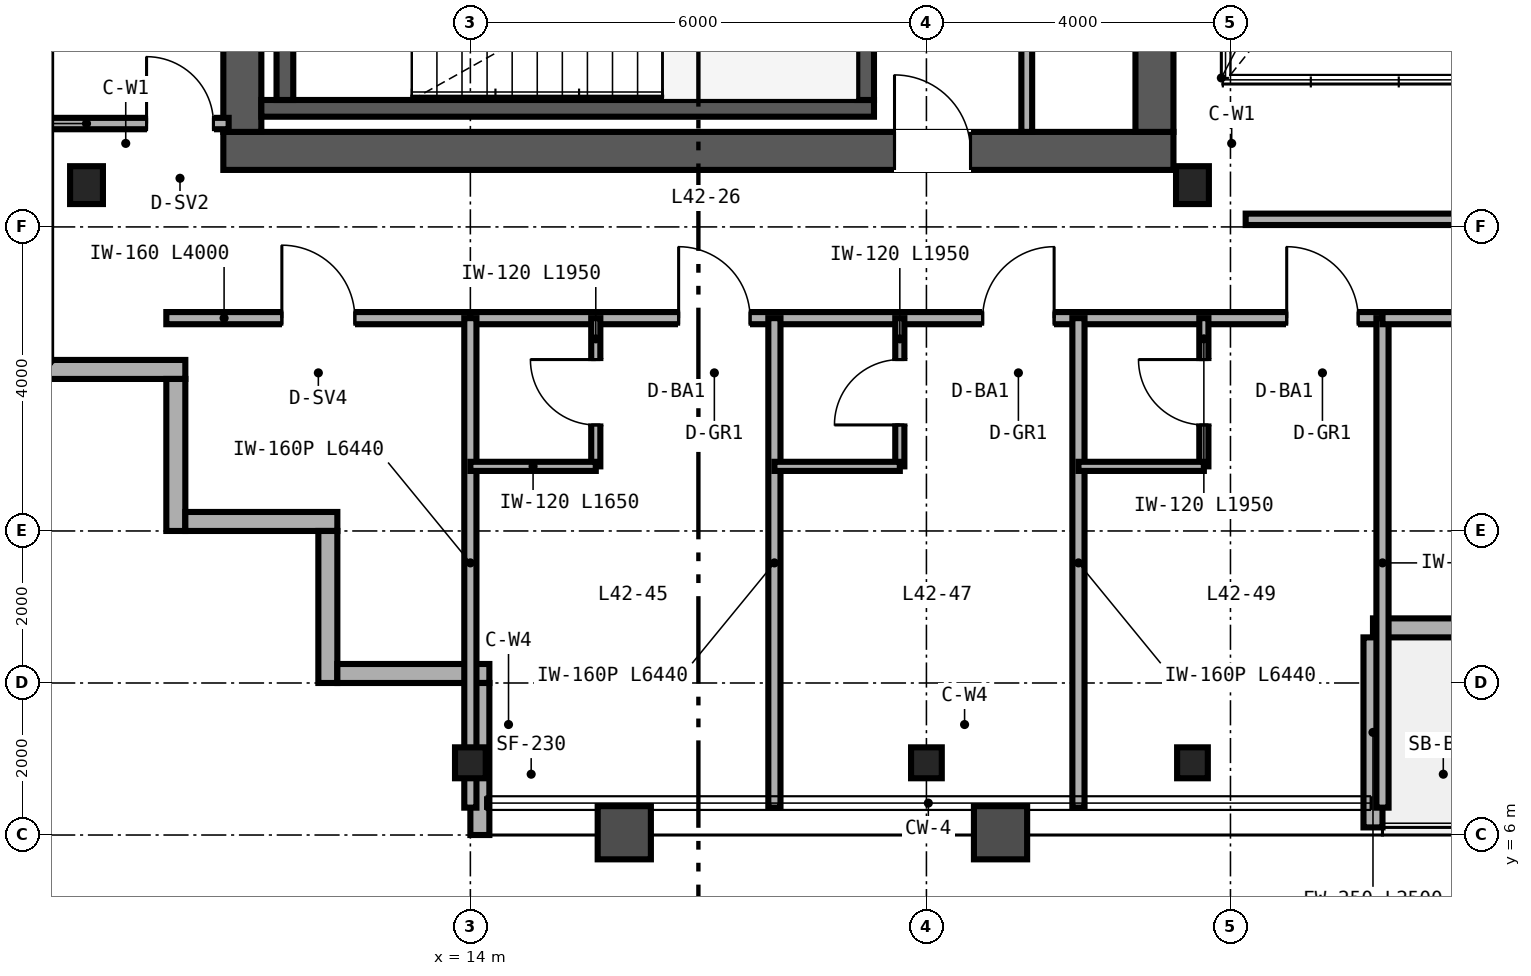
"""IFC4 building model, lengths in metres.
Left out: names, types, materials, properties, quantities, classifications, styles, units other than length and angle.
Written with IfcOpenShell. Run it as: python <this file> out.ifc"""

import sys

from ifc_helpers import new_model, si_unit, direction, frame, frame_2d, origin, origin_2d, place, context, subcontext, project, spatial, rectangle, i_section, extrude, source, transform, mapped, element, fill, save


model = new_model("IFC4")
c1 = context("Model", 3, precision=1e-05, world=origin(), true_north=direction((0.0, 1.0)))
c2 = subcontext(c1, "Body", "Model", "MODEL_VIEW")
j1 = project(units=[si_unit("LENGTHUNIT", "METRE"), si_unit("PLANEANGLEUNIT", "RADIAN")], contexts=[c1])
p1 = place(None, origin())
s1 = spatial("IfcSite", under=j1, at=p1, CompositionType="ELEMENT")
p2 = place(p1, origin())
s2 = spatial("IfcBuilding", under=s1, at=p2, CompositionType="ELEMENT")
p3 = place(p2, frame((0.0, 0.0, 170.4)))
s3 = spatial("IfcBuildingStorey", under=s2, at=p3, CompositionType="ELEMENT", Elevation=170.4)
p4 = place(p3, frame((10.75, 15.0, 0.0), z_axis=(0.0, 0.0, 1.0), x_axis=(1.0, 0.0, 0.0)))
e1 = element("IfcWall", 1, at=p4, inside=s3, PredefinedType="SHEAR", context=c2, shape_type="SweptSolid", body=[
    extrude(rectangle(XDim=12.5, YDim=0.5, at=frame_2d((6.25, 0.0))), origin(), (0.0, 0.0, 1.0), 3.37),
])
p5 = place(p4, frame((8.83, 0.0, 0.0)))
e2 = element("IfcOpeningElement", 2, at=p5, cuts=e1, PredefinedType="OPENING", context=c2, shape_type="SweptSolid", body=[
    extrude(rectangle(XDim=1.0, YDim=2.15, at=frame_2d((0.5, 1.075))), frame((0.0, 0.26, 0.0), z_axis=(0.0, -1.0, 0.0), x_axis=(1.0, 0.0, 0.0)), (0.0, 0.0, 1.0), 0.52),
])
for number, where, z_axis, x_axis in (
    (3, (11.0, 15.25, 0.0), (0.0, 0.0, 1.0), (0.0, 1.0, 0.0)),
    (4, (23.0, 15.25, 0.0), (0.0, 0.0, 1.0), (0.0, 1.0, 0.0)),
):
    element("IfcWall", number, at=place(p3, frame(where, z_axis=z_axis, x_axis=x_axis)), inside=s3, PredefinedType="SHEAR", context=c2, shape_type="SweptSolid", body=[
        extrude(rectangle(XDim=21.5, YDim=0.5, at=frame_2d((10.75, 0.0))), origin(), (0.0, 0.0, 1.0), 3.37),
    ])
p6 = place(p3, frame((11.25, 15.56, 0.0), z_axis=(0.0, 0.0, 1.0), x_axis=(1.0, 0.0, 0.0)))
e5 = element("IfcWall", 5, at=p6, inside=s3, PredefinedType="SHEAR", context=c2, shape_type="SweptSolid", body=[
    extrude(rectangle(XDim=8.06, YDim=0.22, at=frame_2d((4.03, 0.0))), origin(), (0.0, 0.0, 1.0), 3.4),
])
for number, where, z_axis, x_axis in (
    (6, (11.56, 15.67, 0.0), (0.0, 0.0, 1.0), (0.0, 1.0, 0.0)),
    (7, (19.2, 15.67, 0.0), (0.0, 0.0, 1.0), (0.0, 1.0, 0.0)),
):
    element("IfcWall", number, at=place(p3, frame(where, z_axis=z_axis, x_axis=x_axis)), inside=s3, PredefinedType="SHEAR", context=c2, shape_type="SweptSolid", body=[
        extrude(rectangle(XDim=3.28, YDim=0.22, at=frame_2d((1.64, 0.0))), origin(), (0.0, 0.0, 1.0), 3.4),
    ])
m1 = source(origin(), c2, "Body", "SweptSolid", [
    extrude(i_section(OverallWidth=0.432, OverallDepth=0.498, WebThickness=0.056, FlangeThickness=0.089, FilletRadius=0.025, at=origin_2d()), origin(), (0.0, 0.0, 1.0), 3.37),
])
for number, where, z_axis, x_axis in (
    (8, (8.95, 14.55, 0.0), (0.0, 0.0, 1.0), (1.0, 0.0, 0.0)),
    (9, (23.5, 14.55, 0.0), (0.0, 0.0, 1.0), (1.0, 0.0, 0.0)),
):
    element("IfcColumn", number, at=place(p3, frame(where, z_axis=z_axis, x_axis=x_axis)), inside=s3, PredefinedType="COLUMN", context=c2, shape_type="MappedRepresentation", body=[
        mapped(m1, transform((0.0, 0.0, 0.0), scale=1.0)),
    ])
m2 = source(origin(), c2, "Body", "SweptSolid", [
    extrude(i_section(OverallWidth=0.404, OverallDepth=0.407, WebThickness=0.027, FlangeThickness=0.044, FilletRadius=0.025, at=origin_2d()), origin(), (0.0, 0.0, 1.0), 3.37),
])
for number, where, z_axis, x_axis in (
    (10, (14.0, 6.95, 0.0), (0.0, 0.0, 1.0), (1.0, 0.0, 0.0)),
    (11, (20.0, 6.95, 0.0), (0.0, 0.0, 1.0), (1.0, 0.0, 0.0)),
    (12, (23.5, 6.95, 0.0), (0.0, 0.0, 1.0), (1.0, 0.0, 0.0)),
):
    element("IfcColumn", number, at=place(p3, frame(where, z_axis=z_axis, x_axis=x_axis)), inside=s3, PredefinedType="COLUMN", context=c2, shape_type="MappedRepresentation", body=[
        mapped(m2, transform((0.0, 0.0, 0.0), scale=1.0)),
    ])
p7 = place(p3, frame((8.0, 12.125, 0.0), z_axis=(0.0, 0.0, 1.0), x_axis=(1.0, 0.0, 0.0)))
e13 = element("IfcWall", 13, at=p7, inside=s3, PredefinedType="SOLIDWALL", context=c2, shape_type="SweptSolid", body=[
    extrude(rectangle(XDim=2.25, YDim=0.25, at=frame_2d((1.125, 0.0))), origin(), (0.0, 0.0, 1.0), 3.37),
])
for number, where, z_axis, x_axis in (
    (14, (10.125, 12.0, 0.0), (0.0, 0.0, 1.0), (0.0, -1.0, 0.0)),
    (15, (10.25, 10.125, 0.0), (0.0, 0.0, 1.0), (1.0, 0.0, 0.0)),
    (16, (12.125, 10.0, 0.0), (0.0, 0.0, 1.0), (0.0, -1.0, 0.0)),
    (17, (12.25, 8.125, 0.0), (0.0, 0.0, 1.0), (1.0, 0.0, 0.0)),
):
    element("IfcWall", number, at=place(p3, frame(where, z_axis=z_axis, x_axis=x_axis)), inside=s3, PredefinedType="SOLIDWALL", context=c2, shape_type="SweptSolid", body=[
        extrude(rectangle(XDim=2.0, YDim=0.25, at=frame_2d((1.0, 0.0))), origin(), (0.0, 0.0, 1.0), 3.37),
    ])
p8 = place(p3, frame((14.125, 8.0, 0.0), z_axis=(0.0, 0.0, 1.0), x_axis=(0.0, -1.0, 0.0)))
e18 = element("IfcWall", 18, at=p8, inside=s3, PredefinedType="SOLIDWALL", context=c2, shape_type="SweptSolid", body=[
    extrude(rectangle(XDim=2.0, YDim=0.25, at=frame_2d((1.0, 0.0))), origin(), (0.0, 0.0, 1.0), 2.677),
])
p9 = place(p3, frame((25.875, 8.725, 0.0), z_axis=(0.0, 0.0, 1.0), x_axis=(1.0, 0.0, 0.0)))
e19 = element("IfcWall", 19, at=p9, inside=s3, PredefinedType="SOLIDWALL", context=c2, shape_type="SweptSolid", body=[
    extrude(rectangle(XDim=12.25, YDim=0.25, at=frame_2d((6.125, 0.0))), origin(), (0.0, 0.0, 1.0), 3.37),
])
p10 = place(p9, frame((5.6, 0.0, 0.0)))
e20 = element("IfcOpeningElement", 20, at=p10, cuts=e19, PredefinedType="OPENING", context=c2, shape_type="SweptSolid", body=[
    extrude(rectangle(XDim=1.05, YDim=2.15, at=frame_2d((0.525, 1.075))), frame((0.0, 0.135, 0.0), z_axis=(0.0, -1.0, 0.0), x_axis=(1.0, 0.0, 0.0)), (0.0, 0.0, 1.0), 0.27),
])
p11 = place(p3, frame((25.875, 6.1, 0.0), z_axis=(0.0, 0.0, 1.0), x_axis=(0.0, 1.0, 0.0)))
e21 = element("IfcWall", 21, at=p11, inside=s3, PredefinedType="SOLIDWALL", context=c2, shape_type="SweptSolid", body=[
    extrude(rectangle(XDim=2.5, YDim=0.25, at=frame_2d((1.25, 0.0))), origin(), (0.0, 0.0, 1.0), 2.443),
])
p12 = place(p3, frame((21.32, 15.25, 0.0), z_axis=(0.0, 0.0, 1.0), x_axis=(0.0, 1.0, 0.0)))
e22 = element("IfcWall", 22, at=p12, inside=s3, PredefinedType="PARTITIONING", context=c2, shape_type="SweptSolid", body=[
    extrude(rectangle(XDim=3.59, YDim=0.142, at=frame_2d((1.795, 0.0))), origin(), (0.0, 0.0, 1.0), 3.37),
])
p13 = place(p12, frame((1.25, 0.0, 0.0)))
e23 = element("IfcOpeningElement", 23, at=p13, cuts=e22, PredefinedType="OPENING", context=c2, shape_type="SweptSolid", body=[
    extrude(rectangle(XDim=0.84, YDim=2.1, at=frame_2d((0.42, 1.05))), frame((0.0, 0.081, 0.0), z_axis=(0.0, -1.0, 0.0), x_axis=(1.0, 0.0, 0.0)), (0.0, 0.0, 1.0), 0.162),
])
p14 = place(p3, frame((24.2, 14.1, 0.0), z_axis=(0.0, 0.0, 1.0), x_axis=(1.0, 0.0, 0.0)))
e24 = element("IfcWall", 24, at=p14, inside=s3, PredefinedType="PARTITIONING", context=c2, shape_type="SweptSolid", body=[
    extrude(rectangle(XDim=15.6, YDim=0.15, at=frame_2d((7.8, 0.0))), origin(), (0.0, 0.0, 1.0), 3.37),
])
p15 = place(p14, frame((7.0, 0.0, 0.0)))
e25 = element("IfcOpeningElement", 25, at=p15, cuts=e24, PredefinedType="OPENING", context=c2, shape_type="SweptSolid", body=[
    extrude(rectangle(XDim=0.96, YDim=2.15, at=frame_2d((0.48, 1.075))), frame((0.0, 0.085, 0.0), z_axis=(0.0, -1.0, 0.0), x_axis=(1.0, 0.0, 0.0)), (0.0, 0.0, 1.0), 0.17),
])
p16 = place(p3, frame((8.16, 15.36, 0.0), z_axis=(0.0, 0.0, 1.0), x_axis=(1.0, 0.0, 0.0)))
e26 = element("IfcWall", 26, at=p16, inside=s3, PredefinedType="PARTITIONING", context=c2, shape_type="SweptSolid", body=[
    extrude(rectangle(XDim=2.66, YDim=0.15, at=frame_2d((1.33, 0.0))), origin(), (0.0, 0.0, 1.0), 2.591),
])
p17 = place(p16, frame((1.58, 0.0, 0.0)))
e27 = element("IfcOpeningElement", 27, at=p17, cuts=e26, PredefinedType="OPENING", context=c2, shape_type="SweptSolid", body=[
    extrude(rectangle(XDim=0.88, YDim=2.15, at=frame_2d((0.44, 1.075))), frame((0.0, 0.085, 0.0), z_axis=(0.0, -1.0, 0.0), x_axis=(1.0, 0.0, 0.0)), (0.0, 0.0, 1.0), 0.17),
])
p18 = place(p3, frame((10.0, 12.8, 0.0), z_axis=(0.0, 0.0, 1.0), x_axis=(1.0, 0.0, 0.0)))
e28 = element("IfcWall", 28, at=p18, inside=s3, PredefinedType="PARTITIONING", context=c2, shape_type="SweptSolid", body=[
    extrude(rectangle(XDim=4.0, YDim=0.16, at=frame_2d((2.0, 0.0))), origin(), (0.0, 0.0, 1.0), 3.37),
])
p19 = place(p18, frame((1.52, 0.0, 0.0)))
e29 = element("IfcOpeningElement", 29, at=p19, cuts=e28, PredefinedType="OPENING", context=c2, shape_type="SweptSolid", body=[
    extrude(rectangle(XDim=0.96, YDim=2.15, at=frame_2d((0.48, 1.075))), frame((0.0, 0.09, 0.0), z_axis=(0.0, -1.0, 0.0), x_axis=(1.0, 0.0, 0.0)), (0.0, 0.0, 1.0), 0.18),
])
p20 = place(p3, frame((14.0, 12.8, 0.0), z_axis=(0.0, 0.0, 1.0), x_axis=(1.0, 0.0, 0.0)))
e30 = element("IfcWall", 30, at=p20, inside=s3, PredefinedType="PARTITIONING", context=c2, shape_type="SweptSolid", body=[
    extrude(rectangle(XDim=12.0, YDim=0.16, at=frame_2d((6.0, 0.0))), origin(), (0.0, 0.0, 1.0), 2.913),
])
p21 = place(p20, frame((2.74, 0.0, 0.0)))
e31 = element("IfcOpeningElement", 31, at=p21, cuts=e30, PredefinedType="OPENING", context=c2, shape_type="SweptSolid", body=[
    extrude(rectangle(XDim=0.94, YDim=2.15, at=frame_2d((0.47, 1.075))), frame((0.0, 0.09, 0.0), z_axis=(0.0, -1.0, 0.0), x_axis=(1.0, 0.0, 0.0)), (0.0, 0.0, 1.0), 0.18),
])
p22 = place(p20, frame((6.74, 0.0, 0.0)))
e32 = element("IfcOpeningElement", 32, at=p22, cuts=e30, PredefinedType="OPENING", context=c2, shape_type="SweptSolid", body=[
    extrude(rectangle(XDim=0.94, YDim=2.15, at=frame_2d((0.47, 1.075))), frame((0.0, 0.09, 0.0), z_axis=(0.0, -1.0, 0.0), x_axis=(1.0, 0.0, 0.0)), (0.0, 0.0, 1.0), 0.18),
])
p23 = place(p20, frame((10.74, 0.0, 0.0)))
e33 = element("IfcOpeningElement", 33, at=p23, cuts=e30, PredefinedType="OPENING", context=c2, shape_type="SweptSolid", body=[
    extrude(rectangle(XDim=0.94, YDim=2.15, at=frame_2d((0.47, 1.075))), frame((0.0, 0.09, 0.0), z_axis=(0.0, -1.0, 0.0), x_axis=(1.0, 0.0, 0.0)), (0.0, 0.0, 1.0), 0.18),
])
p24 = place(p3, frame((14.0, 6.36, 0.0), z_axis=(0.0, 0.0, 1.0), x_axis=(0.0, 1.0, 0.0)))
e34 = element("IfcWall", 34, at=p24, inside=s3, PredefinedType="PARTITIONING", context=c2, shape_type="SweptSolid", body=[
    extrude(rectangle(XDim=6.44, YDim=0.16, at=frame_2d((3.22, 0.0))), origin(), (0.0, 0.0, 1.0), 2.677),
])
p25 = place(p3, frame((26.0, 6.36, 0.0), z_axis=(0.0, 0.0, 1.0), x_axis=(0.0, 1.0, 0.0)))
e35 = element("IfcWall", 35, at=p25, inside=s3, PredefinedType="PARTITIONING", context=c2, shape_type="SweptSolid", body=[
    extrude(rectangle(XDim=6.44, YDim=0.16, at=frame_2d((3.22, 0.0))), origin(), (0.0, 0.0, 1.0), 2.443),
])
p26 = place(p3, frame((18.0, 6.36, 0.0), z_axis=(0.0, 0.0, 1.0), x_axis=(0.0, 1.0, 0.0)))
e36 = element("IfcWall", 36, at=p26, inside=s3, PredefinedType="PARTITIONING", context=c2, shape_type="SweptSolid", body=[
    extrude(rectangle(XDim=6.44, YDim=0.16, at=frame_2d((3.22, 0.0))), origin(), (0.0, 0.0, 1.0), 2.677),
])
p27 = place(p3, frame((15.65, 10.85, 0.0), z_axis=(0.0, 0.0, 1.0), x_axis=(0.0, 1.0, 0.0)))
e37 = element("IfcWall", 37, at=p27, inside=s3, PredefinedType="PARTITIONING", context=c2, shape_type="SweptSolid", body=[
    extrude(rectangle(XDim=1.95, YDim=0.12, at=frame_2d((0.975, 0.0))), origin(), (0.0, 0.0, 1.0), 3.37),
])
p28 = place(p27, frame((0.545, 0.0, 0.0)))
e38 = element("IfcOpeningElement", 38, at=p28, cuts=e37, PredefinedType="OPENING", context=c2, shape_type="SweptSolid", body=[
    extrude(rectangle(XDim=0.86, YDim=2.1, at=frame_2d((0.43, 1.05))), frame((0.0, 0.07, 0.0), z_axis=(0.0, -1.0, 0.0), x_axis=(1.0, 0.0, 0.0)), (0.0, 0.0, 1.0), 0.14),
])
p29 = place(p3, frame((14.0, 10.85, 0.0), z_axis=(0.0, 0.0, 1.0), x_axis=(1.0, 0.0, 0.0)))
e39 = element("IfcWall", 39, at=p29, inside=s3, PredefinedType="PARTITIONING", context=c2, shape_type="SweptSolid", body=[
    extrude(rectangle(XDim=1.65, YDim=0.12, at=frame_2d((0.825, 0.0))), origin(), (0.0, 0.0, 1.0), 3.37),
])
p30 = place(p3, frame((22.0, 6.36, 0.0), z_axis=(0.0, 0.0, 1.0), x_axis=(0.0, 1.0, 0.0)))
e40 = element("IfcWall", 40, at=p30, inside=s3, PredefinedType="PARTITIONING", context=c2, shape_type="SweptSolid", body=[
    extrude(rectangle(XDim=6.44, YDim=0.16, at=frame_2d((3.22, 0.0))), origin(), (0.0, 0.0, 1.0), 2.833),
])
p31 = place(p3, frame((19.65, 10.85, 0.0), z_axis=(0.0, 0.0, 1.0), x_axis=(0.0, 1.0, 0.0)))
e41 = element("IfcWall", 41, at=p31, inside=s3, PredefinedType="PARTITIONING", context=c2, shape_type="SweptSolid", body=[
    extrude(rectangle(XDim=1.95, YDim=0.12, at=frame_2d((0.975, 0.0))), origin(), (0.0, 0.0, 1.0), 3.37),
])
p32 = place(p31, frame((0.545, 0.0, 0.0)))
e42 = element("IfcOpeningElement", 42, at=p32, cuts=e41, PredefinedType="OPENING", context=c2, shape_type="SweptSolid", body=[
    extrude(rectangle(XDim=0.86, YDim=2.1, at=frame_2d((0.43, 1.05))), frame((0.0, 0.07, 0.0), z_axis=(0.0, -1.0, 0.0), x_axis=(1.0, 0.0, 0.0)), (0.0, 0.0, 1.0), 0.14),
])
p33 = place(p3, frame((18.0, 10.85, 0.0), z_axis=(0.0, 0.0, 1.0), x_axis=(1.0, 0.0, 0.0)))
e43 = element("IfcWall", 43, at=p33, inside=s3, PredefinedType="PARTITIONING", context=c2, shape_type="SweptSolid", body=[
    extrude(rectangle(XDim=1.65, YDim=0.12, at=frame_2d((0.825, 0.0))), origin(), (0.0, 0.0, 1.0), 3.37),
])
p34 = place(p3, frame((23.65, 10.85, 0.0), z_axis=(0.0, 0.0, 1.0), x_axis=(0.0, 1.0, 0.0)))
e44 = element("IfcWall", 44, at=p34, inside=s3, PredefinedType="PARTITIONING", context=c2, shape_type="SweptSolid", body=[
    extrude(rectangle(XDim=1.95, YDim=0.12, at=frame_2d((0.975, 0.0))), origin(), (0.0, 0.0, 1.0), 2.913),
])
p35 = place(p34, frame((0.545, 0.0, 0.0)))
e45 = element("IfcOpeningElement", 45, at=p35, cuts=e44, PredefinedType="OPENING", context=c2, shape_type="SweptSolid", body=[
    extrude(rectangle(XDim=0.86, YDim=2.1, at=frame_2d((0.43, 1.05))), frame((0.0, 0.07, 0.0), z_axis=(0.0, -1.0, 0.0), x_axis=(1.0, 0.0, 0.0)), (0.0, 0.0, 1.0), 0.14),
])
p36 = place(p3, frame((22.0, 10.85, 0.0), z_axis=(0.0, 0.0, 1.0), x_axis=(1.0, 0.0, 0.0)))
e46 = element("IfcWall", 46, at=p36, inside=s3, PredefinedType="PARTITIONING", context=c2, shape_type="SweptSolid", body=[
    extrude(rectangle(XDim=1.65, YDim=0.12, at=frame_2d((0.825, 0.0))), origin(), (0.0, 0.0, 1.0), 2.913),
])
p37 = place(p3, frame((26.0, 12.8, 0.0), z_axis=(0.0, 0.0, 1.0), x_axis=(1.0, 0.0, 0.0)))
e47 = element("IfcWall", 47, at=p37, inside=s3, PredefinedType="PARTITIONING", context=c2, shape_type="SweptSolid", body=[
    extrude(rectangle(XDim=12.0, YDim=0.16, at=frame_2d((6.0, 0.0))), origin(), (0.0, 0.0, 1.0), 3.37),
])
p38 = place(p37, frame((5.2, 0.0, 0.0)))
e48 = element("IfcOpeningElement", 48, at=p38, cuts=e47, PredefinedType="OPENING", context=c2, shape_type="SweptSolid", body=[
    extrude(rectangle(XDim=0.96, YDim=2.15, at=frame_2d((0.48, 1.075))), frame((0.0, 0.09, 0.0), z_axis=(0.0, -1.0, 0.0), x_axis=(1.0, 0.0, 0.0)), (0.0, 0.0, 1.0), 0.18),
])
m3 = source(origin(), c2, "Body", "SweptSolid", [
    extrude(rectangle(XDim=1.0, YDim=2.15, at=frame_2d((0.5, 1.075))), frame((0.0, 0.025, 0.0), z_axis=(0.0, -1.0, 0.0), x_axis=(1.0, 0.0, 0.0)), (0.0, 0.0, 1.0), 0.05),
])
p39 = place(p5, origin())
e49 = element("IfcDoor", 49, at=p39, inside=s3, OperationType="SINGLE_SWING_LEFT", PredefinedType="DOOR", context=c2, shape_type="MappedRepresentation", body=[
    mapped(m3, transform((0.0, 0.0, 0.0), scale=1.0)),
])
fill(e2, e49)
m4 = source(origin(), c2, "Body", "SweptSolid", [
    extrude(rectangle(XDim=0.88, YDim=2.15, at=frame_2d((0.44, 1.075))), frame((0.0, 0.025, 0.0), z_axis=(0.0, -1.0, 0.0), x_axis=(1.0, 0.0, 0.0)), (0.0, 0.0, 1.0), 0.05),
])
p40 = place(p17, origin())
e50 = element("IfcDoor", 50, at=p40, inside=s3, OperationType="SINGLE_SWING_LEFT", PredefinedType="DOOR", context=c2, shape_type="MappedRepresentation", body=[
    mapped(m4, transform((0.0, 0.0, 0.0), scale=1.0)),
])
fill(e27, e50)
m5 = source(origin(), c2, "Body", "SweptSolid", [
    extrude(rectangle(XDim=0.96, YDim=2.15, at=frame_2d((0.48, 1.075))), frame((0.0, 0.025, 0.0), z_axis=(0.0, -1.0, 0.0), x_axis=(1.0, 0.0, 0.0)), (0.0, 0.0, 1.0), 0.05),
])
p41 = place(p19, origin())
e51 = element("IfcDoor", 51, at=p41, inside=s3, OperationType="SINGLE_SWING_LEFT", PredefinedType="DOOR", context=c2, shape_type="MappedRepresentation", body=[
    mapped(m5, transform((0.0, 0.0, 0.0), scale=1.0)),
])
fill(e29, e51)
m6 = source(origin(), c2, "Body", "SweptSolid", [
    extrude(rectangle(XDim=0.86, YDim=2.1, at=frame_2d((0.43, 1.05))), frame((0.0, 0.025, 0.0), z_axis=(0.0, -1.0, 0.0), x_axis=(1.0, 0.0, 0.0)), (0.0, 0.0, 1.0), 0.05),
])
p42 = place(p28, origin())
e52 = element("IfcDoor", 52, at=p42, inside=s3, OperationType="SINGLE_SWING_RIGHT", PredefinedType="DOOR", context=c2, shape_type="MappedRepresentation", body=[
    mapped(m6, transform((0.0, 0.0, 0.0), scale=1.0)),
])
fill(e38, e52)
p43 = place(p32, origin())
e53 = element("IfcDoor", 53, at=p43, inside=s3, OperationType="SINGLE_SWING_LEFT", PredefinedType="DOOR", context=c2, shape_type="MappedRepresentation", body=[
    mapped(m6, transform((0.0, 0.0, 0.0), scale=1.0)),
])
fill(e42, e53)
p44 = place(p35, origin())
e54 = element("IfcDoor", 54, at=p44, inside=s3, OperationType="SINGLE_SWING_RIGHT", PredefinedType="DOOR", context=c2, shape_type="MappedRepresentation", body=[
    mapped(m6, transform((0.0, 0.0, 0.0), scale=1.0)),
])
fill(e45, e54)
m7 = source(origin(), c2, "Body", "SweptSolid", [
    extrude(rectangle(XDim=0.94, YDim=2.15, at=frame_2d((0.47, 1.075))), frame((0.0, 0.025, 0.0), z_axis=(0.0, -1.0, 0.0), x_axis=(1.0, 0.0, 0.0)), (0.0, 0.0, 1.0), 0.05),
])
p45 = place(p21, origin())
e55 = element("IfcDoor", 55, at=p45, inside=s3, OperationType="SINGLE_SWING_LEFT", PredefinedType="DOOR", context=c2, shape_type="MappedRepresentation", body=[
    mapped(m7, transform((0.0, 0.0, 0.0), scale=1.0)),
])
fill(e31, e55)
p46 = place(p22, origin())
e56 = element("IfcDoor", 56, at=p46, inside=s3, OperationType="SINGLE_SWING_RIGHT", PredefinedType="DOOR", context=c2, shape_type="MappedRepresentation", body=[
    mapped(m7, transform((0.0, 0.0, 0.0), scale=1.0)),
])
fill(e32, e56)
p47 = place(p23, origin())
e57 = element("IfcDoor", 57, at=p47, inside=s3, OperationType="SINGLE_SWING_LEFT", PredefinedType="DOOR", context=c2, shape_type="MappedRepresentation", body=[
    mapped(m7, transform((0.0, 0.0, 0.0), scale=1.0)),
])
fill(e33, e57)
save(model, sys.argv[1])
